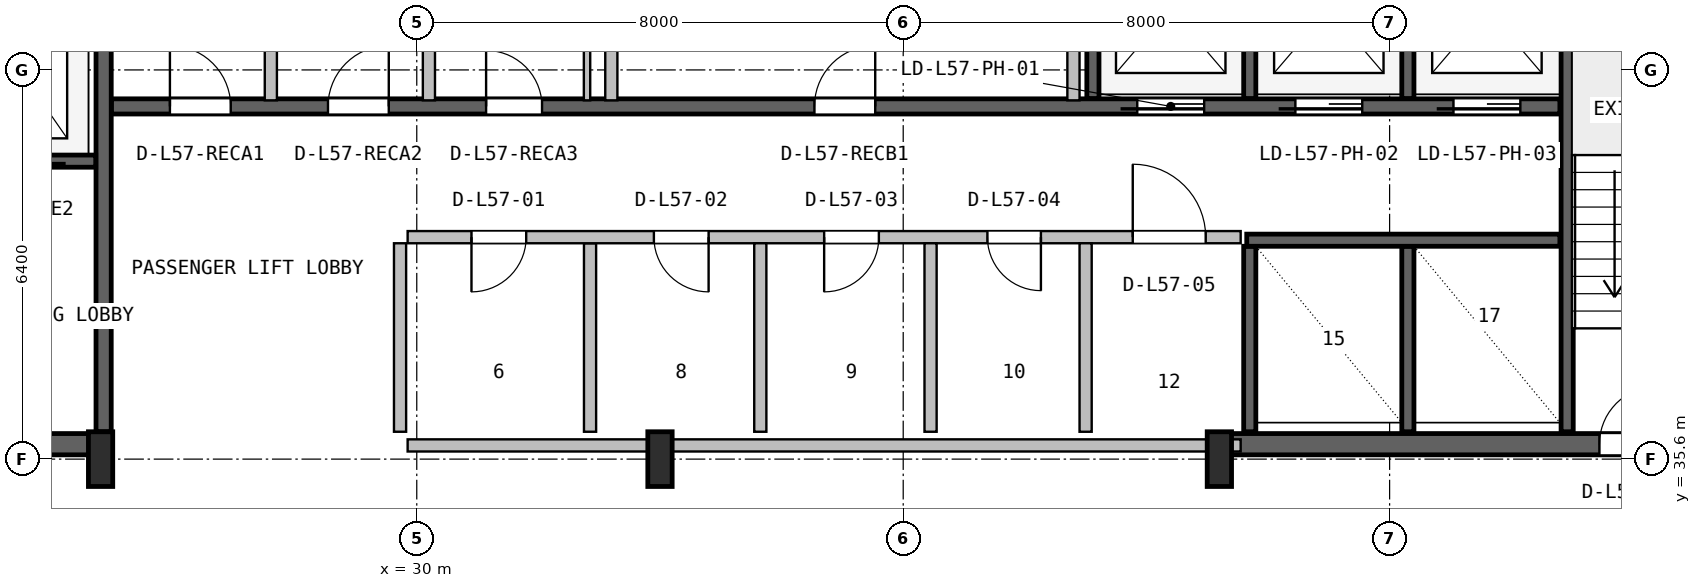
"""IFC4 building model, lengths in metres.
Left out: names, types, materials, properties, quantities, classifications, styles, units other than length and angle.
Written with IfcOpenShell. Run it as: python <this file> out.ifc"""

import sys

from ifc_helpers import new_model, si_unit, direction, frame, frame_2d, origin, origin_2d, place, context, subcontext, project, spatial, rectangle, i_section, extrude, source, transform, mapped, element, fill, save


model = new_model("IFC4")
c1 = context("Model", 3, precision=1e-05, world=origin(), true_north=direction((0.0, 1.0)))
c2 = subcontext(c1, "Body", "Model", "MODEL_VIEW")
j1 = project(units=[si_unit("LENGTHUNIT", "METRE"), si_unit("PLANEANGLEUNIT", "RADIAN")], contexts=[c1])
p1 = place(None, origin())
s1 = spatial("IfcSite", under=j1, at=p1, CompositionType="ELEMENT")
p2 = place(p1, origin())
s2 = spatial("IfcBuilding", under=s1, at=p2, CompositionType="ELEMENT")
p3 = place(p2, frame((0.0, 0.0, 230.2)))
s3 = spatial("IfcBuildingStorey", under=s2, at=p3, CompositionType="ELEMENT", Elevation=230.2)
p4 = place(p3, frame((15.67, 35.845, 0.0), z_axis=(0.0, 0.0, 1.0), x_axis=(1.0, 0.0, 0.0)))
e1 = element("IfcWall", 1, at=p4, inside=s3, PredefinedType="SHEAR", context=c2, shape_type="SweptSolid", body=[
    extrude(rectangle(XDim=9.13, YDim=0.35, at=frame_2d((4.565, 0.0))), origin(), (0.0, 0.0, 1.0), 3.48),
])
p5 = place(p4, frame((5.4, 0.0, 0.0)))
e2 = element("IfcOpeningElement", 2, at=p5, cuts=e1, PredefinedType="OPENING", context=c2, shape_type="SweptSolid", body=[
    extrude(rectangle(XDim=1.0, YDim=2.1, at=frame_2d((0.5, 1.05))), frame((0.0, 0.185, 0.0), z_axis=(0.0, -1.0, 0.0), x_axis=(1.0, 0.0, 0.0)), (0.0, 0.0, 1.0), 0.37),
])
p6 = place(p3, frame((43.2, 35.845, 0.0), z_axis=(0.0, 0.0, 1.0), x_axis=(1.0, 0.0, 0.0)))
e3 = element("IfcWall", 3, at=p6, inside=s3, PredefinedType="SHEAR", context=c2, shape_type="SweptSolid", body=[
    extrude(rectangle(XDim=9.13, YDim=0.35, at=frame_2d((4.565, 0.0))), origin(), (0.0, 0.0, 1.0), 3.48),
])
p7 = place(p6, frame((6.25, 0.0, 0.0)))
e4 = element("IfcOpeningElement", 4, at=p7, cuts=e3, PredefinedType="OPENING", context=c2, shape_type="SweptSolid", body=[
    extrude(rectangle(XDim=0.95, YDim=2.1, at=frame_2d((0.475, 1.05))), frame((0.0, 0.185, 0.0), z_axis=(0.0, -1.0, 0.0), x_axis=(1.0, 0.0, 0.0)), (0.0, 0.0, 1.0), 0.37),
])
m1 = source(origin(), c2, "Body", "SweptSolid", [
    extrude(i_section(OverallWidth=0.4, OverallDepth=0.9, WebThickness=0.016, FlangeThickness=0.028, FilletRadius=0.016, at=origin_2d()), origin(), (0.0, 0.0, 1.0), 3.8),
])
for number, where, z_axis, x_axis in (
    (5, (24.8, 35.6, 0.0), (0.0, 0.0, 1.0), (1.0, 0.0, 0.0)),
    (6, (34.0, 35.6, 0.0), (0.0, 0.0, 1.0), (1.0, 0.0, 0.0)),
    (7, (43.2, 35.6, 0.0), (0.0, 0.0, 1.0), (1.0, 0.0, 0.0)),
):
    element("IfcColumn", number, at=place(p3, frame(where, z_axis=z_axis, x_axis=x_axis)), inside=s3, PredefinedType="COLUMN", context=c2, shape_type="MappedRepresentation", body=[
        mapped(m1, transform((0.0, 0.0, 0.0), x_axis=(1.0, 0.0, 0.0), y_axis=(0.0, 1.0, 0.0), z_axis=(0.0, 0.0, 1.0), scale=1.0)),
    ])
p8 = place(p3, frame((24.85, 36.05, 0.0), z_axis=(0.0, 0.0, 1.0), x_axis=(0.0, 1.0, 0.0)))
e8 = element("IfcWall", 8, at=p8, inside=s3, PredefinedType="SHEAR", context=c2, shape_type="SweptSolid", body=[
    extrude(rectangle(XDim=10.45, YDim=0.25, at=frame_2d((5.225, 0.0))), origin(), (0.0, 0.0, 1.0), 3.48),
])
p9 = place(p3, frame((19.2, 40.5, 0.0), z_axis=(0.0, 0.0, 1.0), x_axis=(1.0, 0.0, 0.0)))
e9 = element("IfcWall", 9, at=p9, inside=s3, PredefinedType="SHEAR", context=c2, shape_type="SweptSolid", body=[
    extrude(rectangle(XDim=5.52, YDim=0.2, at=frame_2d((2.76, 0.0))), origin(), (0.0, 0.0, 1.0), 3.48),
])
p10 = place(p9, frame((1.05, 0.0, 0.0)))
e10 = element("IfcOpeningElement", 10, at=p10, cuts=e9, PredefinedType="OPENING", context=c2, shape_type="SweptSolid", body=[
    extrude(rectangle(XDim=1.1, YDim=2.18, at=frame_2d((0.55, 1.09))), frame((0.0, 0.11, 0.0), z_axis=(0.0, -1.0, 0.0), x_axis=(1.0, 0.0, 0.0)), (0.0, 0.0, 1.0), 0.22),
])
p11 = place(p9, frame((3.65, 0.0, 0.0)))
e11 = element("IfcOpeningElement", 11, at=p11, cuts=e9, PredefinedType="OPENING", context=c2, shape_type="SweptSolid", body=[
    extrude(rectangle(XDim=1.1, YDim=2.18, at=frame_2d((0.55, 1.09))), frame((0.0, 0.11, 0.0), z_axis=(0.0, -1.0, 0.0), x_axis=(1.0, 0.0, 0.0)), (0.0, 0.0, 1.0), 0.22),
])
p12 = place(p3, frame((48.92, 36.05, 0.0), z_axis=(0.0, 0.0, 1.0), x_axis=(0.0, 1.0, 0.0)))
e12 = element("IfcWall", 12, at=p12, inside=s3, PredefinedType="SHEAR", context=c2, shape_type="SweptSolid", body=[
    extrude(rectangle(XDim=10.5, YDim=0.2, at=frame_2d((5.25, 0.0))), origin(), (0.0, 0.0, 1.0), 3.48),
])
p13 = place(p3, frame((24.98, 41.4, 0.0), z_axis=(0.0, 0.0, 1.0), x_axis=(1.0, 0.0, 0.0)))
e13 = element("IfcWall", 13, at=p13, inside=s3, PredefinedType="SHEAR", context=c2, shape_type="SweptSolid", body=[
    extrude(rectangle(XDim=23.82, YDim=0.25, at=frame_2d((11.91, 0.0))), origin(), (0.0, 0.0, 1.0), 3.48),
])
p14 = place(p13, frame((16.87, 0.0, 0.0)))
e14 = element("IfcOpeningElement", 14, at=p14, cuts=e13, PredefinedType="OPENING", context=c2, shape_type="SweptSolid", body=[
    extrude(rectangle(XDim=1.1, YDim=2.18, at=frame_2d((0.55, 1.09))), frame((0.0, 0.135, 0.0), z_axis=(0.0, -1.0, 0.0), x_axis=(1.0, 0.0, 0.0)), (0.0, 0.0, 1.0), 0.27),
])
p15 = place(p13, frame((19.47, 0.0, 0.0)))
e15 = element("IfcOpeningElement", 15, at=p15, cuts=e13, PredefinedType="OPENING", context=c2, shape_type="SweptSolid", body=[
    extrude(rectangle(XDim=1.1, YDim=2.18, at=frame_2d((0.55, 1.09))), frame((0.0, 0.135, 0.0), z_axis=(0.0, -1.0, 0.0), x_axis=(1.0, 0.0, 0.0)), (0.0, 0.0, 1.0), 0.27),
])
p16 = place(p13, frame((22.07, 0.0, 0.0)))
e16 = element("IfcOpeningElement", 16, at=p16, cuts=e13, PredefinedType="OPENING", context=c2, shape_type="SweptSolid", body=[
    extrude(rectangle(XDim=1.1, YDim=2.18, at=frame_2d((0.55, 1.09))), frame((0.0, 0.135, 0.0), z_axis=(0.0, -1.0, 0.0), x_axis=(1.0, 0.0, 0.0)), (0.0, 0.0, 1.0), 0.27),
])
p17 = place(p13, frame((0.96, 0.0, 0.0)))
e17 = element("IfcOpeningElement", 17, at=p17, cuts=e13, PredefinedType="OPENING", context=c2, shape_type="SweptSolid", body=[
    extrude(rectangle(XDim=1.0, YDim=2.08, at=frame_2d((0.5, 1.04))), frame((0.0, 0.135, 0.0), z_axis=(0.0, -1.0, 0.0), x_axis=(1.0, 0.0, 0.0)), (0.0, 0.0, 1.0), 0.27),
])
p18 = place(p13, frame((3.56, 0.0, 0.0)))
e18 = element("IfcOpeningElement", 18, at=p18, cuts=e13, PredefinedType="OPENING", context=c2, shape_type="SweptSolid", body=[
    extrude(rectangle(XDim=1.0, YDim=2.08, at=frame_2d((0.5, 1.04))), frame((0.0, 0.135, 0.0), z_axis=(0.0, -1.0, 0.0), x_axis=(1.0, 0.0, 0.0)), (0.0, 0.0, 1.0), 0.27),
])
p19 = place(p13, frame((6.16, 0.0, 0.0)))
e19 = element("IfcOpeningElement", 19, at=p19, cuts=e13, PredefinedType="OPENING", context=c2, shape_type="SweptSolid", body=[
    extrude(rectangle(XDim=0.92, YDim=2.08, at=frame_2d((0.46, 1.04))), frame((0.0, 0.135, 0.0), z_axis=(0.0, -1.0, 0.0), x_axis=(1.0, 0.0, 0.0)), (0.0, 0.0, 1.0), 0.27),
])
p20 = place(p13, frame((11.56, 0.0, 0.0)))
e20 = element("IfcOpeningElement", 20, at=p20, cuts=e13, PredefinedType="OPENING", context=c2, shape_type="SweptSolid", body=[
    extrude(rectangle(XDim=1.0, YDim=2.08, at=frame_2d((0.5, 1.04))), frame((0.0, 0.135, 0.0), z_axis=(0.0, -1.0, 0.0), x_axis=(1.0, 0.0, 0.0)), (0.0, 0.0, 1.0), 0.27),
])
p21 = place(p3, frame((41.12, 41.53, 0.0), z_axis=(0.0, 0.0, 1.0), x_axis=(0.0, 1.0, 0.0)))
e21 = element("IfcWall", 21, at=p21, inside=s3, PredefinedType="SHEAR", context=c2, shape_type="SweptSolid", body=[
    extrude(rectangle(XDim=5.02, YDim=0.2, at=frame_2d((2.51, 0.0))), origin(), (0.0, 0.0, 1.0), 3.48),
])
for number, where, z_axis, x_axis in (
    (22, (43.7, 41.53, 0.0), (0.0, 0.0, 1.0), (0.0, 1.0, 0.0)),
    (23, (46.3, 41.53, 0.0), (0.0, 0.0, 1.0), (0.0, 1.0, 0.0)),
):
    element("IfcWall", number, at=place(p3, frame(where, z_axis=z_axis, x_axis=x_axis)), inside=s3, PredefinedType="SHEAR", context=c2, shape_type="SweptSolid", body=[
        extrude(rectangle(XDim=2.87, YDim=0.2, at=frame_2d((1.435, 0.0))), origin(), (0.0, 0.0, 1.0), 3.48),
    ])
for number, where, z_axis, x_axis in (
    (24, (43.7, 36.05, 0.0), (0.0, 0.0, 1.0), (0.0, 1.0, 0.0)),
    (25, (46.3, 36.05, 0.0), (0.0, 0.0, 1.0), (0.0, 1.0, 0.0)),
):
    element("IfcWall", number, at=place(p3, frame(where, z_axis=z_axis, x_axis=x_axis)), inside=s3, PredefinedType="SHEAR", context=c2, shape_type="SweptSolid", body=[
        extrude(rectangle(XDim=3.05, YDim=0.2, at=frame_2d((1.525, 0.0))), origin(), (0.0, 0.0, 1.0), 3.48),
    ])
p22 = place(p3, frame((43.65, 39.2, 0.0), z_axis=(0.0, 0.0, 1.0), x_axis=(1.0, 0.0, 0.0)))
e26 = element("IfcWall", 26, at=p22, inside=s3, PredefinedType="SHEAR", context=c2, shape_type="SweptSolid", body=[
    extrude(rectangle(XDim=5.15, YDim=0.2, at=frame_2d((2.575, 0.0))), origin(), (0.0, 0.0, 1.0), 3.48),
])
p23 = place(p3, frame((29.85, 35.825, 0.0), z_axis=(0.0, 0.0, 1.0), x_axis=(1.0, 0.0, 0.0)))
e27 = element("IfcWall", 27, at=p23, inside=s3, PredefinedType="SOLIDWALL", context=c2, shape_type="SweptSolid", body=[
    extrude(rectangle(XDim=13.7, YDim=0.2, at=frame_2d((6.85, 0.0))), origin(), (0.0, 0.0, 1.0), 2.505),
])
p24 = place(p3, frame((32.85, 36.05, 0.0), z_axis=(0.0, 0.0, 1.0), x_axis=(0.0, 1.0, 0.0)))
e28 = element("IfcWall", 28, at=p24, inside=s3, PredefinedType="PLUMBINGWALL", context=c2, shape_type="SweptSolid", body=[
    extrude(rectangle(XDim=3.1, YDim=0.2, at=frame_2d((1.55, 0.0))), origin(), (0.0, 0.0, 1.0), 3.46),
])
p25 = place(p3, frame((29.85, 39.25, 0.0), z_axis=(0.0, 0.0, 1.0), x_axis=(1.0, 0.0, 0.0)))
e29 = element("IfcWall", 29, at=p25, inside=s3, PredefinedType="SOLIDWALL", context=c2, shape_type="SweptSolid", body=[
    extrude(rectangle(XDim=13.7, YDim=0.2, at=frame_2d((6.85, 0.0))), origin(), (0.0, 0.0, 1.0), 3.46),
])
p26 = place(p25, frame((1.05, 0.0, 0.0)))
e30 = element("IfcOpeningElement", 30, at=p26, cuts=e29, PredefinedType="OPENING", context=c2, shape_type="SweptSolid", body=[
    extrude(rectangle(XDim=0.9, YDim=2.06, at=frame_2d((0.45, 1.03))), frame((0.0, 0.11, 0.0), z_axis=(0.0, -1.0, 0.0), x_axis=(1.0, 0.0, 0.0)), (0.0, 0.0, 1.0), 0.22),
])
p27 = place(p25, frame((4.05, 0.0, 0.0)))
e31 = element("IfcOpeningElement", 31, at=p27, cuts=e29, PredefinedType="OPENING", context=c2, shape_type="SweptSolid", body=[
    extrude(rectangle(XDim=0.9, YDim=2.06, at=frame_2d((0.45, 1.03))), frame((0.0, 0.11, 0.0), z_axis=(0.0, -1.0, 0.0), x_axis=(1.0, 0.0, 0.0)), (0.0, 0.0, 1.0), 0.22),
])
p28 = place(p25, frame((6.85, 0.0, 0.0)))
e32 = element("IfcOpeningElement", 32, at=p28, cuts=e29, PredefinedType="OPENING", context=c2, shape_type="SweptSolid", body=[
    extrude(rectangle(XDim=0.9, YDim=2.06, at=frame_2d((0.45, 1.03))), frame((0.0, 0.11, 0.0), z_axis=(0.0, -1.0, 0.0), x_axis=(1.0, 0.0, 0.0)), (0.0, 0.0, 1.0), 0.22),
])
p29 = place(p25, frame((9.535, 0.0, 0.0)))
e33 = element("IfcOpeningElement", 33, at=p29, cuts=e29, PredefinedType="OPENING", context=c2, shape_type="SweptSolid", body=[
    extrude(rectangle(XDim=0.88, YDim=2.06, at=frame_2d((0.44, 1.03))), frame((0.0, 0.11, 0.0), z_axis=(0.0, -1.0, 0.0), x_axis=(1.0, 0.0, 0.0)), (0.0, 0.0, 1.0), 0.22),
])
p30 = place(p25, frame((11.925, 0.0, 0.0)))
e34 = element("IfcOpeningElement", 34, at=p30, cuts=e29, PredefinedType="OPENING", context=c2, shape_type="SweptSolid", body=[
    extrude(rectangle(XDim=1.2, YDim=2.1, at=frame_2d((0.6, 1.05))), frame((0.0, 0.11, 0.0), z_axis=(0.0, -1.0, 0.0), x_axis=(1.0, 0.0, 0.0)), (0.0, 0.0, 1.0), 0.22),
])
for number, where, z_axis, x_axis in (
    (35, (29.725, 36.05, 0.0), (0.0, 0.0, 1.0), (0.0, 1.0, 0.0)),
    (36, (35.65, 36.05, 0.0), (0.0, 0.0, 1.0), (0.0, 1.0, 0.0)),
    (37, (38.45, 36.05, 0.0), (0.0, 0.0, 1.0), (0.0, 1.0, 0.0)),
):
    element("IfcWall", number, at=place(p3, frame(where, z_axis=z_axis, x_axis=x_axis)), inside=s3, PredefinedType="PLUMBINGWALL", context=c2, shape_type="SweptSolid", body=[
        extrude(rectangle(XDim=3.1, YDim=0.2, at=frame_2d((1.55, 0.0))), origin(), (0.0, 0.0, 1.0), 3.46),
    ])
p31 = place(p3, frame((41.0, 36.05, 0.0), z_axis=(0.0, 0.0, 1.0), x_axis=(0.0, 1.0, 0.0)))
e38 = element("IfcWall", 38, at=p31, inside=s3, PredefinedType="SOLIDWALL", context=c2, shape_type="SweptSolid", body=[
    extrude(rectangle(XDim=3.1, YDim=0.2, at=frame_2d((1.55, 0.0))), origin(), (0.0, 0.0, 1.0), 3.46),
])
for number, where, z_axis, x_axis in (
    (39, (27.6, 41.5, 0.0), (0.0, 0.0, 1.0), (0.0, 1.0, 0.0)),
    (40, (30.2, 41.5, 0.0), (0.0, 0.0, 1.0), (0.0, 1.0, 0.0)),
):
    element("IfcWall", number, at=place(p3, frame(where, z_axis=z_axis, x_axis=x_axis)), inside=s3, PredefinedType="SOLIDWALL", context=c2, shape_type="SweptSolid", body=[
        extrude(rectangle(XDim=5.02, YDim=0.2, at=frame_2d((2.51, 0.0))), origin(), (0.0, 0.0, 1.0), 3.46),
    ])
p32 = place(p3, frame((32.8, 41.5, 0.0), z_axis=(0.0, 0.0, 1.0), x_axis=(0.0, 1.0, 0.0)))
e41 = element("IfcWall", 41, at=p32, inside=s3, PredefinedType="PARTITIONING", context=c2, shape_type="SweptSolid", body=[
    extrude(rectangle(XDim=5.02, YDim=0.105, at=frame_2d((2.51, 0.0))), origin(), (0.0, 0.0, 1.0), 3.46),
])
for number, where, z_axis, x_axis in (
    (42, (40.8, 41.5, 0.0), (0.0, 0.0, 1.0), (0.0, 1.0, 0.0)),
    (43, (33.2, 41.5, 0.0), (0.0, 0.0, 1.0), (0.0, 1.0, 0.0)),
):
    element("IfcWall", number, at=place(p3, frame(where, z_axis=z_axis, x_axis=x_axis)), inside=s3, PredefinedType="SOLIDWALL", context=c2, shape_type="SweptSolid", body=[
        extrude(rectangle(XDim=5.02, YDim=0.2, at=frame_2d((2.51, 0.0))), origin(), (0.0, 0.0, 1.0), 3.46),
    ])
m2 = source(origin(), c2, "Body", "SweptSolid", [
    extrude(rectangle(XDim=0.95, YDim=2.1, at=frame_2d((0.475, 1.05))), frame((0.0, 0.025, 0.0), z_axis=(0.0, -1.0, 0.0), x_axis=(1.0, 0.0, 0.0)), (0.0, 0.0, 1.0), 0.05),
])
p33 = place(p7, origin())
e44 = element("IfcDoor", 44, at=p33, inside=s3, OperationType="SINGLE_SWING_RIGHT", PredefinedType="DOOR", context=c2, shape_type="MappedRepresentation", body=[
    mapped(m2, transform((0.0, 0.0, 0.0), x_axis=(1.0, 0.0, 0.0), y_axis=(0.0, 1.0, 0.0), z_axis=(0.0, 0.0, 1.0), scale=1.0)),
])
fill(e4, e44)
m3 = source(origin(), c2, "Body", "SweptSolid", [
    extrude(rectangle(XDim=1.1, YDim=2.18, at=frame_2d((0.55, 1.09))), frame((0.0, 0.025, 0.0), z_axis=(0.0, -1.0, 0.0), x_axis=(1.0, 0.0, 0.0)), (0.0, 0.0, 1.0), 0.05),
])
p34 = place(p14, frame((1.1, 0.0, 0.0), z_axis=(0.0, 0.0, 1.0), x_axis=(-1.0, 0.0, 0.0)))
e45 = element("IfcDoor", 45, at=p34, inside=s3, OperationType="SLIDING_TO_LEFT", PredefinedType="DOOR", context=c2, shape_type="MappedRepresentation", body=[
    mapped(m3, transform((0.0, 0.0, 0.0), x_axis=(1.0, 0.0, 0.0), y_axis=(0.0, 1.0, 0.0), z_axis=(0.0, 0.0, 1.0), scale=1.0)),
])
fill(e14, e45)
p35 = place(p15, frame((1.1, 0.0, 0.0), z_axis=(0.0, 0.0, 1.0), x_axis=(-1.0, 0.0, 0.0)))
e46 = element("IfcDoor", 46, at=p35, inside=s3, OperationType="SLIDING_TO_LEFT", PredefinedType="DOOR", context=c2, shape_type="MappedRepresentation", body=[
    mapped(m3, transform((0.0, 0.0, 0.0), x_axis=(1.0, 0.0, 0.0), y_axis=(0.0, 1.0, 0.0), z_axis=(0.0, 0.0, 1.0), scale=1.0)),
])
fill(e15, e46)
p36 = place(p16, frame((1.1, 0.0, 0.0), z_axis=(0.0, 0.0, 1.0), x_axis=(-1.0, 0.0, 0.0)))
e47 = element("IfcDoor", 47, at=p36, inside=s3, OperationType="SLIDING_TO_LEFT", PredefinedType="DOOR", context=c2, shape_type="MappedRepresentation", body=[
    mapped(m3, transform((0.0, 0.0, 0.0), x_axis=(1.0, 0.0, 0.0), y_axis=(0.0, 1.0, 0.0), z_axis=(0.0, 0.0, 1.0), scale=1.0)),
])
fill(e16, e47)
m4 = source(origin(), c2, "Body", "SweptSolid", [
    extrude(rectangle(XDim=1.0, YDim=2.08, at=frame_2d((0.5, 1.04))), frame((0.0, 0.025, 0.0), z_axis=(0.0, -1.0, 0.0), x_axis=(1.0, 0.0, 0.0)), (0.0, 0.0, 1.0), 0.05),
])
p37 = place(p17, origin())
e48 = element("IfcDoor", 48, at=p37, inside=s3, OperationType="SINGLE_SWING_LEFT", PredefinedType="DOOR", context=c2, shape_type="MappedRepresentation", body=[
    mapped(m4, transform((0.0, 0.0, 0.0), x_axis=(1.0, 0.0, 0.0), y_axis=(0.0, 1.0, 0.0), z_axis=(0.0, 0.0, 1.0), scale=1.0)),
])
fill(e17, e48)
p38 = place(p18, origin())
e49 = element("IfcDoor", 49, at=p38, inside=s3, OperationType="SINGLE_SWING_RIGHT", PredefinedType="DOOR", context=c2, shape_type="MappedRepresentation", body=[
    mapped(m4, transform((0.0, 0.0, 0.0), x_axis=(1.0, 0.0, 0.0), y_axis=(0.0, 1.0, 0.0), z_axis=(0.0, 0.0, 1.0), scale=1.0)),
])
fill(e18, e49)
m5 = source(origin(), c2, "Body", "SweptSolid", [
    extrude(rectangle(XDim=0.92, YDim=2.08, at=frame_2d((0.46, 1.04))), frame((0.0, 0.025, 0.0), z_axis=(0.0, -1.0, 0.0), x_axis=(1.0, 0.0, 0.0)), (0.0, 0.0, 1.0), 0.05),
])
p39 = place(p19, origin())
e50 = element("IfcDoor", 50, at=p39, inside=s3, OperationType="SINGLE_SWING_LEFT", PredefinedType="DOOR", context=c2, shape_type="MappedRepresentation", body=[
    mapped(m5, transform((0.0, 0.0, 0.0), x_axis=(1.0, 0.0, 0.0), y_axis=(0.0, 1.0, 0.0), z_axis=(0.0, 0.0, 1.0), scale=1.0)),
])
fill(e19, e50)
p40 = place(p20, origin())
e51 = element("IfcDoor", 51, at=p40, inside=s3, OperationType="SINGLE_SWING_RIGHT", PredefinedType="DOOR", context=c2, shape_type="MappedRepresentation", body=[
    mapped(m4, transform((0.0, 0.0, 0.0), x_axis=(1.0, 0.0, 0.0), y_axis=(0.0, 1.0, 0.0), z_axis=(0.0, 0.0, 1.0), scale=1.0)),
])
fill(e20, e51)
m6 = source(origin(), c2, "Body", "SweptSolid", [
    extrude(rectangle(XDim=0.9, YDim=2.06, at=frame_2d((0.45, 1.03))), frame((0.0, 0.025, 0.0), z_axis=(0.0, -1.0, 0.0), x_axis=(1.0, 0.0, 0.0)), (0.0, 0.0, 1.0), 0.05),
])
p41 = place(p26, frame((0.9, 0.0, 0.0), z_axis=(0.0, 0.0, 1.0), x_axis=(-1.0, 0.0, 0.0)))
e52 = element("IfcDoor", 52, at=p41, inside=s3, OperationType="SINGLE_SWING_LEFT", PredefinedType="DOOR", context=c2, shape_type="MappedRepresentation", body=[
    mapped(m6, transform((0.0, 0.0, 0.0), x_axis=(1.0, 0.0, 0.0), y_axis=(0.0, 1.0, 0.0), z_axis=(0.0, 0.0, 1.0), scale=1.0)),
])
fill(e30, e52)
p42 = place(p27, frame((0.9, 0.0, 0.0), z_axis=(0.0, 0.0, 1.0), x_axis=(-1.0, 0.0, 0.0)))
e53 = element("IfcDoor", 53, at=p42, inside=s3, OperationType="SINGLE_SWING_RIGHT", PredefinedType="DOOR", context=c2, shape_type="MappedRepresentation", body=[
    mapped(m6, transform((0.0, 0.0, 0.0), x_axis=(1.0, 0.0, 0.0), y_axis=(0.0, 1.0, 0.0), z_axis=(0.0, 0.0, 1.0), scale=1.0)),
])
fill(e31, e53)
p43 = place(p28, frame((0.9, 0.0, 0.0), z_axis=(0.0, 0.0, 1.0), x_axis=(-1.0, 0.0, 0.0)))
e54 = element("IfcDoor", 54, at=p43, inside=s3, OperationType="SINGLE_SWING_LEFT", PredefinedType="DOOR", context=c2, shape_type="MappedRepresentation", body=[
    mapped(m6, transform((0.0, 0.0, 0.0), x_axis=(1.0, 0.0, 0.0), y_axis=(0.0, 1.0, 0.0), z_axis=(0.0, 0.0, 1.0), scale=1.0)),
])
fill(e32, e54)
m7 = source(origin(), c2, "Body", "SweptSolid", [
    extrude(rectangle(XDim=0.88, YDim=2.06, at=frame_2d((0.44, 1.03))), frame((0.0, 0.025, 0.0), z_axis=(0.0, -1.0, 0.0), x_axis=(1.0, 0.0, 0.0)), (0.0, 0.0, 1.0), 0.05),
])
p44 = place(p29, frame((0.88, 0.0, 0.0), z_axis=(0.0, 0.0, 1.0), x_axis=(-1.0, 0.0, 0.0)))
e55 = element("IfcDoor", 55, at=p44, inside=s3, OperationType="SINGLE_SWING_RIGHT", PredefinedType="DOOR", context=c2, shape_type="MappedRepresentation", body=[
    mapped(m7, transform((0.0, 0.0, 0.0), x_axis=(1.0, 0.0, 0.0), y_axis=(0.0, 1.0, 0.0), z_axis=(0.0, 0.0, 1.0), scale=1.0)),
])
fill(e33, e55)
m8 = source(origin(), c2, "Body", "SweptSolid", [
    extrude(rectangle(XDim=1.2, YDim=2.1, at=frame_2d((0.6, 1.05))), frame((0.0, 0.025, 0.0), z_axis=(0.0, -1.0, 0.0), x_axis=(1.0, 0.0, 0.0)), (0.0, 0.0, 1.0), 0.05),
])
p45 = place(p30, origin())
e56 = element("IfcDoor", 56, at=p45, inside=s3, OperationType="SINGLE_SWING_LEFT", PredefinedType="DOOR", context=c2, shape_type="MappedRepresentation", body=[
    mapped(m8, transform((0.0, 0.0, 0.0), x_axis=(1.0, 0.0, 0.0), y_axis=(0.0, 1.0, 0.0), z_axis=(0.0, 0.0, 1.0), scale=1.0)),
])
fill(e34, e56)
save(model, sys.argv[1])
